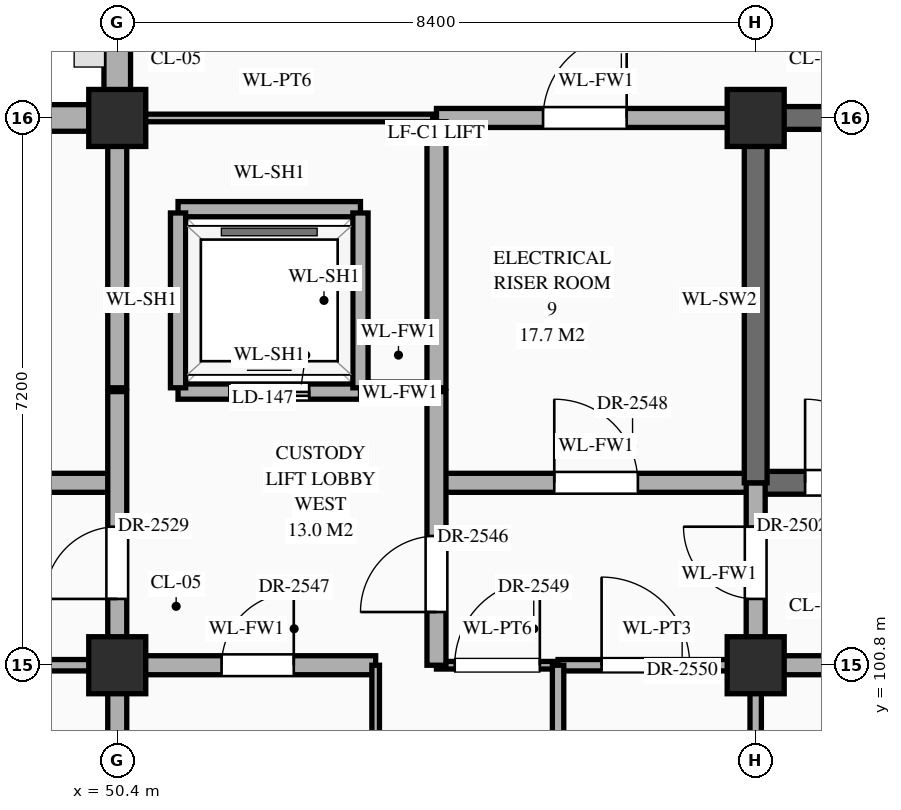
"""IFC4 building model, lengths in metres.
Left out: names, types, materials, properties, quantities, classifications, styles, units other than length and angle.
Written with IfcOpenShell. Run it as: python <this file> out.ifc"""

import sys

from ifc_helpers import new_model, si_unit, direction, frame, frame_2d, origin, origin_2d, place, context, subcontext, project, spatial, rectangle, extrude, element, fill, save


model = new_model("IFC4")
c1 = context("Model", 3, precision=1e-05, world=origin(), true_north=direction((0.0, 1.0)))
c2 = subcontext(c1, "Body", "Model", "MODEL_VIEW")
j1 = project(units=[si_unit("LENGTHUNIT", "METRE"), si_unit("PLANEANGLEUNIT", "RADIAN")], contexts=[c1])
p1 = place(None, origin())
s1 = spatial("IfcSite", under=j1, at=p1, CompositionType="ELEMENT")
p2 = place(p1, origin())
s2 = spatial("IfcBuilding", under=s1, at=p2, CompositionType="ELEMENT")
p3 = place(p2, frame((0.0, 0.0, 35.1)))
s3 = spatial("IfcBuildingStorey", under=s2, at=p3, CompositionType="ELEMENT", Elevation=35.1)
for number, where, z_axis, x_axis in (
    (1, (50.4, 100.8, 0.0), (0.0, 0.0, 1.0), (1.0, 0.0, 0.0)),
    (2, (50.4, 108.0, 0.0), (0.0, 0.0, 1.0), (1.0, 0.0, 0.0)),
    (3, (58.8, 100.8, 0.0), (0.0, 0.0, 1.0), (1.0, 0.0, 0.0)),
    (4, (58.8, 108.0, 0.0), (0.0, 0.0, 1.0), (1.0, 0.0, 0.0)),
):
    element("IfcColumn", number, at=place(p3, frame(where, z_axis=z_axis, x_axis=x_axis)), inside=s3, PredefinedType="COLUMN", context=c2, shape_type="SweptSolid", body=[
        extrude(rectangle(XDim=0.75, YDim=0.75, at=origin_2d()), origin(), (0.0, 0.0, 1.0), 4.2),
    ])
p4 = place(p3, frame((42.37, 108.0, 0.0), z_axis=(0.0, 0.0, 1.0), x_axis=(1.0, 0.0, 0.0)))
e5 = element("IfcWall", 5, at=p4, inside=s3, PredefinedType="STANDARD", context=c2, shape_type="SweptSolid", body=[
    extrude(rectangle(XDim=7.66, YDim=0.35, at=frame_2d((3.83, 0.0))), origin(), (0.0, 0.0, 1.0), 3.3),
])
p5 = place(p3, frame((50.4, 108.37, 0.0), z_axis=(0.0, 0.0, 1.0), x_axis=(0.0, 1.0, 0.0)))
e6 = element("IfcWall", 6, at=p5, inside=s3, PredefinedType="STANDARD", context=c2, shape_type="SweptSolid", body=[
    extrude(rectangle(XDim=6.46, YDim=0.35, at=frame_2d((3.23, 0.0))), origin(), (0.0, 0.0, 1.0), 3.3),
])
p6 = place(p5, frame((4.08, 0.0, 0.85)))
e7 = element("IfcOpeningElement", 7, at=p6, cuts=e6, PredefinedType="OPENING", context=c2, shape_type="SweptSolid", body=[
    extrude(rectangle(XDim=0.9, YDim=2.12, at=frame_2d((0.45, 1.06))), frame((0.0, 0.187, 0.0), z_axis=(0.0, -1.0, 0.0), x_axis=(1.0, 0.0, 0.0)), (0.0, 0.0, 1.0), 0.374),
])
p7 = place(p3, frame((46.2, 100.8, 0.0), z_axis=(0.0, 0.0, 1.0), x_axis=(1.0, 0.0, 0.0)))
e8 = element("IfcWall", 8, at=p7, inside=s3, PredefinedType="STANDARD", context=c2, shape_type="SweptSolid", body=[
    extrude(rectangle(XDim=4.2, YDim=0.15, at=frame_2d((2.1, 0.0))), origin(), (0.0, 0.0, 1.0), 3.1),
])
p8 = place(p7, frame((1.433, 0.0, 0.0)))
e9 = element("IfcOpeningElement", 9, at=p8, cuts=e8, PredefinedType="OPENING", context=c2, shape_type="SweptSolid", body=[
    extrude(rectangle(XDim=1.04, YDim=2.2, at=frame_2d((0.52, 1.1))), frame((0.0, 0.087, 0.0), z_axis=(0.0, -1.0, 0.0), x_axis=(1.0, 0.0, 0.0)), (0.0, 0.0, 1.0), 0.174),
])
p9 = place(p3, frame((50.4, 100.8, 0.0), z_axis=(0.0, 0.0, 1.0), x_axis=(1.0, 0.0, 0.0)))
e10 = element("IfcWall", 10, at=p9, inside=s3, PredefinedType="STANDARD", context=c2, shape_type="SweptSolid", body=[
    extrude(rectangle(XDim=3.4, YDim=0.25, at=frame_2d((1.7, 0.0))), origin(), (0.0, 0.0, 1.0), 3.1),
])
p10 = place(p9, frame((1.373, 0.0, 0.0)))
e11 = element("IfcOpeningElement", 11, at=p10, cuts=e10, PredefinedType="OPENING", context=c2, shape_type="SweptSolid", body=[
    extrude(rectangle(XDim=0.95, YDim=2.15, at=frame_2d((0.475, 1.075))), frame((0.0, 0.137, 0.0), z_axis=(0.0, -1.0, 0.0), x_axis=(1.0, 0.0, 0.0)), (0.0, 0.0, 1.0), 0.274),
])
p11 = place(p3, frame((54.6, 100.8, 0.0), z_axis=(0.0, 0.0, 1.0), x_axis=(1.0, 0.0, 0.0)))
e12 = element("IfcWall", 12, at=p11, inside=s3, PredefinedType="STANDARD", context=c2, shape_type="SweptSolid", body=[
    extrude(rectangle(XDim=1.6, YDim=0.1, at=frame_2d((0.8, 0.0))), origin(), (0.0, 0.0, 1.0), 3.1),
])
p12 = place(p11, frame((0.24, 0.0, 0.0)))
e13 = element("IfcOpeningElement", 13, at=p12, cuts=e12, PredefinedType="OPENING", context=c2, shape_type="SweptSolid", body=[
    extrude(rectangle(XDim=1.12, YDim=2.25, at=frame_2d((0.56, 1.125))), frame((0.0, 0.062, 0.0), z_axis=(0.0, -1.0, 0.0), x_axis=(1.0, 0.0, 0.0)), (0.0, 0.0, 1.0), 0.124),
])
p13 = place(p3, frame((56.2, 100.8, 0.0), z_axis=(0.0, 0.0, 1.0), x_axis=(1.0, 0.0, 0.0)))
e14 = element("IfcWall", 14, at=p13, inside=s3, PredefinedType="STANDARD", context=c2, shape_type="SweptSolid", body=[
    extrude(rectangle(XDim=2.6, YDim=0.15, at=frame_2d((1.3, 0.0))), origin(), (0.0, 0.0, 1.0), 3.1),
])
p14 = place(p13, frame((0.573, 0.0, 0.0)))
e15 = element("IfcOpeningElement", 15, at=p14, cuts=e14, PredefinedType="OPENING", context=c2, shape_type="SweptSolid", body=[
    extrude(rectangle(XDim=1.16, YDim=2.3, at=frame_2d((0.58, 1.15))), frame((0.0, 0.087, 0.0), z_axis=(0.0, -1.0, 0.0), x_axis=(1.0, 0.0, 0.0)), (0.0, 0.0, 1.0), 0.174),
])
p15 = place(p3, frame((58.8, 100.8, 0.0), z_axis=(0.0, 0.0, 1.0), x_axis=(1.0, 0.0, 0.0)))
e16 = element("IfcWall", 16, at=p15, inside=s3, PredefinedType="STANDARD", context=c2, shape_type="SweptSolid", body=[
    extrude(rectangle(XDim=12.6, YDim=0.25, at=frame_2d((6.3, 0.0))), origin(), (0.0, 0.0, 1.0), 3.1),
])
p16 = place(p15, frame((3.65, 0.0, 0.0)))
e17 = element("IfcOpeningElement", 17, at=p16, cuts=e16, PredefinedType="OPENING", context=c2, shape_type="SweptSolid", body=[
    extrude(rectangle(XDim=1.1, YDim=2.2, at=frame_2d((0.55, 1.1))), frame((0.0, 0.137, 0.0), z_axis=(0.0, -1.0, 0.0), x_axis=(1.0, 0.0, 0.0)), (0.0, 0.0, 1.0), 0.274),
])
p17 = place(p3, frame((46.2, 103.2, 0.0), z_axis=(0.0, 0.0, 1.0), x_axis=(1.0, 0.0, 0.0)))
e18 = element("IfcWall", 18, at=p17, inside=s3, PredefinedType="STANDARD", context=c2, shape_type="SweptSolid", body=[
    extrude(rectangle(XDim=4.2, YDim=0.25, at=frame_2d((2.1, 0.0))), origin(), (0.0, 0.0, 1.0), 3.95),
])
p18 = place(p17, frame((1.6, 0.0, 0.0)))
e19 = element("IfcOpeningElement", 19, at=p18, cuts=e18, PredefinedType="OPENING", context=c2, shape_type="SweptSolid", body=[
    extrude(rectangle(XDim=1.0, YDim=2.2, at=frame_2d((0.5, 1.1))), frame((0.0, 0.137, 0.0), z_axis=(0.0, -1.0, 0.0), x_axis=(1.0, 0.0, 0.0)), (0.0, 0.0, 1.0), 0.274),
])
p19 = place(p3, frame((54.6, 103.2, 0.0), z_axis=(0.0, 0.0, 1.0), x_axis=(1.0, 0.0, 0.0)))
e20 = element("IfcWall", 20, at=p19, inside=s3, PredefinedType="STANDARD", context=c2, shape_type="SweptSolid", body=[
    extrude(rectangle(XDim=4.2, YDim=0.25, at=frame_2d((2.1, 0.0))), origin(), (0.0, 0.0, 1.0), 3.95),
])
p20 = place(p19, frame((1.55, 0.0, 0.0)))
e21 = element("IfcOpeningElement", 21, at=p20, cuts=e20, PredefinedType="OPENING", context=c2, shape_type="SweptSolid", body=[
    extrude(rectangle(XDim=1.1, YDim=2.2, at=frame_2d((0.55, 1.1))), frame((0.0, 0.137, 0.0), z_axis=(0.0, -1.0, 0.0), x_axis=(1.0, 0.0, 0.0)), (0.0, 0.0, 1.0), 0.274),
])
p21 = place(p3, frame((58.8, 103.2, 0.0), z_axis=(0.0, 0.0, 1.0), x_axis=(1.0, 0.0, 0.0)))
e22 = element("IfcWall", 22, at=p21, inside=s3, PredefinedType="SHEAR", context=c2, shape_type="SweptSolid", body=[
    extrude(rectangle(XDim=8.4, YDim=0.3, at=frame_2d((4.2, 0.0))), origin(), (0.0, 0.0, 1.0), 3.95),
])
p22 = place(p21, frame((0.65, 0.0, 0.0)))
e23 = element("IfcOpeningElement", 23, at=p22, cuts=e22, PredefinedType="OPENING", context=c2, shape_type="SweptSolid", body=[
    extrude(rectangle(XDim=1.1, YDim=2.2, at=frame_2d((0.55, 1.1))), frame((0.0, 0.162, 0.0), z_axis=(0.0, -1.0, 0.0), x_axis=(1.0, 0.0, 0.0)), (0.0, 0.0, 1.0), 0.324),
])
p23 = place(p3, frame((51.2, 104.4, 0.0), z_axis=(0.0, 0.0, 1.0), x_axis=(1.0, 0.0, 0.0)))
e24 = element("IfcWall", 24, at=p23, inside=s3, PredefinedType="STANDARD", context=c2, shape_type="SweptSolid", body=[
    extrude(rectangle(XDim=2.4, YDim=0.2, at=frame_2d((1.2, 0.0))), origin(), (0.0, 0.0, 1.0), 3.95),
])
p24 = place(p23, frame((0.675, 0.0, 0.0)))
e25 = element("IfcOpeningElement", 25, at=p24, cuts=e24, PredefinedType="OPENING", context=c2, shape_type="SweptSolid", body=[
    extrude(rectangle(XDim=1.05, YDim=2.15, at=frame_2d((0.525, 1.075))), frame((0.0, 0.112, 0.0), z_axis=(0.0, -1.0, 0.0), x_axis=(1.0, 0.0, 0.0)), (0.0, 0.0, 1.0), 0.224),
])
p25 = place(p3, frame((53.65, 104.4, 0.0), z_axis=(0.0, 0.0, 1.0), x_axis=(1.0, 0.0, 0.0)))
e26 = element("IfcWall", 26, at=p25, inside=s3, PredefinedType="STANDARD", context=c2, shape_type="SweptSolid", body=[
    extrude(rectangle(XDim=0.9, YDim=0.25, at=frame_2d((0.45, 0.0))), origin(), (0.0, 0.0, 1.0), 3.95),
])
p26 = place(p3, frame((51.2, 106.8, 0.0), z_axis=(0.0, 0.0, 1.0), x_axis=(1.0, 0.0, 0.0)))
e27 = element("IfcWall", 27, at=p26, inside=s3, PredefinedType="STANDARD", context=c2, shape_type="SweptSolid", body=[
    extrude(rectangle(XDim=2.4, YDim=0.2, at=frame_2d((1.2, 0.0))), origin(), (0.0, 0.0, 1.0), 3.95),
])
p27 = place(p3, frame((50.45, 108.0, 0.0), z_axis=(0.0, 0.0, 1.0), x_axis=(1.0, 0.0, 0.0)))
e28 = element("IfcWall", 28, at=p27, inside=s3, PredefinedType="STANDARD", context=c2, shape_type="SweptSolid", body=[
    extrude(rectangle(XDim=4.1, YDim=0.1, at=frame_2d((2.05, 0.0))), origin(), (0.0, 0.0, 1.0), 3.1),
])
p28 = place(p3, frame((54.6, 108.0, 0.0), z_axis=(0.0, 0.0, 1.0), x_axis=(1.0, 0.0, 0.0)))
e29 = element("IfcWall", 29, at=p28, inside=s3, PredefinedType="STANDARD", context=c2, shape_type="SweptSolid", body=[
    extrude(rectangle(XDim=4.2, YDim=0.25, at=frame_2d((2.1, 0.0))), origin(), (0.0, 0.0, 1.0), 3.1),
])
p29 = place(p28, frame((1.403, 0.0, 0.0)))
e30 = element("IfcOpeningElement", 30, at=p29, cuts=e29, PredefinedType="OPENING", context=c2, shape_type="SweptSolid", body=[
    extrude(rectangle(XDim=1.1, YDim=2.2, at=frame_2d((0.55, 1.1))), frame((0.0, 0.137, 0.0), z_axis=(0.0, -1.0, 0.0), x_axis=(1.0, 0.0, 0.0)), (0.0, 0.0, 1.0), 0.274),
])
p30 = place(p3, frame((58.8, 108.0, 0.0), z_axis=(0.0, 0.0, 1.0), x_axis=(1.0, 0.0, 0.0)))
e31 = element("IfcWall", 31, at=p30, inside=s3, PredefinedType="SHEAR", context=c2, shape_type="SweptSolid", body=[
    extrude(rectangle(XDim=8.4, YDim=0.3, at=frame_2d((4.2, 0.0))), origin(), (0.0, 0.0, 1.0), 3.95),
])
p31 = place(p3, frame((50.4, 91.2, 0.0), z_axis=(0.0, 0.0, 1.0), x_axis=(0.0, 1.0, 0.0)))
e32 = element("IfcWall", 32, at=p31, inside=s3, PredefinedType="STANDARD", context=c2, shape_type="SweptSolid", body=[
    extrude(rectangle(XDim=13.2, YDim=0.25, at=frame_2d((6.6, 0.0))), origin(), (0.0, 0.0, 1.0), 3.2),
])
p32 = place(p31, frame((0.577, 0.0, 0.0)))
e33 = element("IfcOpeningElement", 33, at=p32, cuts=e32, PredefinedType="OPENING", context=c2, shape_type="SweptSolid", body=[
    extrude(rectangle(XDim=0.95, YDim=2.15, at=frame_2d((0.475, 1.075))), frame((0.0, 0.137, 0.0), z_axis=(0.0, -1.0, 0.0), x_axis=(1.0, 0.0, 0.0)), (0.0, 0.0, 1.0), 0.274),
])
p33 = place(p31, frame((10.472, 0.0, 0.0)))
e34 = element("IfcOpeningElement", 34, at=p33, cuts=e32, PredefinedType="OPENING", context=c2, shape_type="SweptSolid", body=[
    extrude(rectangle(XDim=0.95, YDim=2.15, at=frame_2d((0.475, 1.075))), frame((0.0, 0.137, 0.0), z_axis=(0.0, -1.0, 0.0), x_axis=(1.0, 0.0, 0.0)), (0.0, 0.0, 1.0), 0.274),
])
p34 = place(p31, frame((3.198, 0.0, 0.0)))
e35 = element("IfcOpeningElement", 35, at=p34, cuts=e32, PredefinedType="OPENING", context=c2, shape_type="SweptSolid", body=[
    extrude(rectangle(XDim=1.1, YDim=2.2, at=frame_2d((0.55, 1.1))), frame((0.0, 0.137, 0.0), z_axis=(0.0, -1.0, 0.0), x_axis=(1.0, 0.0, 0.0)), (0.0, 0.0, 1.0), 0.274),
])
p35 = place(p3, frame((50.4, 104.45, 0.0), z_axis=(0.0, 0.0, 1.0), x_axis=(0.0, 1.0, 0.0)))
e36 = element("IfcWall", 36, at=p35, inside=s3, PredefinedType="STANDARD", context=c2, shape_type="SweptSolid", body=[
    extrude(rectangle(XDim=3.46, YDim=0.25, at=frame_2d((1.73, 0.0))), origin(), (0.0, 0.0, 1.0), 3.2),
])
for number, where, z_axis, x_axis in (
    (37, (51.2, 104.45, 0.0), (0.0, 0.0, 1.0), (0.0, 1.0, 0.0)),
    (38, (53.6, 104.45, 0.0), (0.0, 0.0, 1.0), (0.0, 1.0, 0.0)),
):
    element("IfcWall", number, at=place(p3, frame(where, z_axis=z_axis, x_axis=x_axis)), inside=s3, PredefinedType="STANDARD", context=c2, shape_type="SweptSolid", body=[
        extrude(rectangle(XDim=2.3, YDim=0.2, at=frame_2d((1.15, 0.0))), origin(), (0.0, 0.0, 1.0), 3.95),
    ])
p36 = place(p3, frame((53.8, 96.0, 0.0), z_axis=(0.0, 0.0, 1.0), x_axis=(0.0, 1.0, 0.0)))
e39 = element("IfcWall", 39, at=p36, inside=s3, PredefinedType="STANDARD", context=c2, shape_type="SweptSolid", body=[
    extrude(rectangle(XDim=4.8, YDim=0.1, at=frame_2d((2.4, 0.0))), origin(), (0.0, 0.0, 1.0), 3.95),
])
p37 = place(p36, frame((1.87, 0.0, 0.0)))
e40 = element("IfcOpeningElement", 40, at=p37, cuts=e39, PredefinedType="OPENING", context=c2, shape_type="SweptSolid", body=[
    extrude(rectangle(XDim=1.06, YDim=2.4, at=frame_2d((0.53, 1.2))), frame((0.0, 0.062, 0.0), z_axis=(0.0, -1.0, 0.0), x_axis=(1.0, 0.0, 0.0)), (0.0, 0.0, 1.0), 0.124),
])
p38 = place(p3, frame((54.6, 100.8, 0.0), z_axis=(0.0, 0.0, 1.0), x_axis=(0.0, 1.0, 0.0)))
e41 = element("IfcWall", 41, at=p38, inside=s3, PredefinedType="STANDARD", context=c2, shape_type="SweptSolid", body=[
    extrude(rectangle(XDim=3.6, YDim=0.25, at=frame_2d((1.8, 0.0))), origin(), (0.0, 0.0, 1.0), 3.65),
])
p39 = place(p38, frame((0.7, 0.0, 0.0)))
e42 = element("IfcOpeningElement", 42, at=p39, cuts=e41, PredefinedType="OPENING", context=c2, shape_type="SweptSolid", body=[
    extrude(rectangle(XDim=1.0, YDim=2.2, at=frame_2d((0.5, 1.1))), frame((0.0, 0.137, 0.0), z_axis=(0.0, -1.0, 0.0), x_axis=(1.0, 0.0, 0.0)), (0.0, 0.0, 1.0), 0.274),
])
p40 = place(p3, frame((54.6, 104.45, 0.0), z_axis=(0.0, 0.0, 1.0), x_axis=(0.0, 1.0, 0.0)))
e43 = element("IfcWall", 43, at=p40, inside=s3, PredefinedType="STANDARD", context=c2, shape_type="SweptSolid", body=[
    extrude(rectangle(XDim=3.5, YDim=0.25, at=frame_2d((1.75, 0.0))), origin(), (0.0, 0.0, 1.0), 3.65),
])
p41 = place(p3, frame((56.2, 96.0, 0.0), z_axis=(0.0, 0.0, 1.0), x_axis=(0.0, 1.0, 0.0)))
e44 = element("IfcWall", 44, at=p41, inside=s3, PredefinedType="STANDARD", context=c2, shape_type="SweptSolid", body=[
    extrude(rectangle(XDim=4.8, YDim=0.15, at=frame_2d((2.4, 0.0))), origin(), (0.0, 0.0, 1.0), 3.95),
])
p42 = place(p41, frame((1.83, 0.0, 0.0)))
e45 = element("IfcOpeningElement", 45, at=p42, cuts=e44, PredefinedType="OPENING", context=c2, shape_type="SweptSolid", body=[
    extrude(rectangle(XDim=1.14, YDim=2.4, at=frame_2d((0.57, 1.2))), frame((0.0, 0.087, 0.0), z_axis=(0.0, -1.0, 0.0), x_axis=(1.0, 0.0, 0.0)), (0.0, 0.0, 1.0), 0.174),
])
p43 = place(p3, frame((58.8, 96.0, 0.0), z_axis=(0.0, 0.0, 1.0), x_axis=(0.0, 1.0, 0.0)))
e46 = element("IfcWall", 46, at=p43, inside=s3, PredefinedType="STANDARD", context=c2, shape_type="SweptSolid", body=[
    extrude(rectangle(XDim=4.8, YDim=0.15, at=frame_2d((2.4, 0.0))), origin(), (0.0, 0.0, 1.0), 3.2),
])
p44 = place(p3, frame((58.8, 100.8, 0.0), z_axis=(0.0, 0.0, 1.0), x_axis=(0.0, 1.0, 0.0)))
e47 = element("IfcWall", 47, at=p44, inside=s3, PredefinedType="STANDARD", context=c2, shape_type="SweptSolid", body=[
    extrude(rectangle(XDim=2.4, YDim=0.25, at=frame_2d((1.2, 0.0))), origin(), (0.0, 0.0, 1.0), 3.2),
])
p45 = place(p44, frame((0.873, 0.0, 0.0)))
e48 = element("IfcOpeningElement", 48, at=p45, cuts=e47, PredefinedType="OPENING", context=c2, shape_type="SweptSolid", body=[
    extrude(rectangle(XDim=0.95, YDim=2.15, at=frame_2d((0.475, 1.075))), frame((0.0, 0.137, 0.0), z_axis=(0.0, -1.0, 0.0), x_axis=(1.0, 0.0, 0.0)), (0.0, 0.0, 1.0), 0.274),
])
p46 = place(p3, frame((58.8, 103.2, 0.0), z_axis=(0.0, 0.0, 1.0), x_axis=(0.0, 1.0, 0.0)))
e49 = element("IfcWall", 49, at=p46, inside=s3, PredefinedType="SHEAR", context=c2, shape_type="SweptSolid", body=[
    extrude(rectangle(XDim=4.8, YDim=0.3, at=frame_2d((2.4, 0.0))), origin(), (0.0, 0.0, 1.0), 3.95),
])
p47 = place(p24, origin())
e50 = element("IfcDoor", 50, at=p47, inside=s3, OperationType="DOUBLE_DOOR_SLIDING", PredefinedType="DOOR", context=c2, shape_type="SweptSolid", body=[
    extrude(rectangle(XDim=1.05, YDim=2.15, at=frame_2d((0.525, 1.075))), frame((0.0, 0.025, 0.0), z_axis=(0.0, -1.0, 0.0), x_axis=(1.0, 0.0, 0.0)), (0.0, 0.0, 1.0), 0.05),
])
fill(e25, e50)
p48 = place(p22, origin())
e51 = element("IfcDoor", 51, at=p48, inside=s3, OperationType="SINGLE_SWING_LEFT", PredefinedType="DOOR", context=c2, shape_type="SweptSolid", body=[
    extrude(rectangle(XDim=1.1, YDim=2.2, at=frame_2d((0.55, 1.1))), frame((0.0, 0.025, 0.0), z_axis=(0.0, -1.0, 0.0), x_axis=(1.0, 0.0, 0.0)), (0.0, 0.0, 1.0), 0.05),
])
fill(e23, e51)
p49 = place(p45, origin())
e52 = element("IfcDoor", 52, at=p49, inside=s3, OperationType="SINGLE_SWING_RIGHT", PredefinedType="DOOR", context=c2, shape_type="SweptSolid", body=[
    extrude(rectangle(XDim=0.95, YDim=2.15, at=frame_2d((0.475, 1.075))), frame((0.0, 0.025, 0.0), z_axis=(0.0, -1.0, 0.0), x_axis=(1.0, 0.0, 0.0)), (0.0, 0.0, 1.0), 0.05),
])
fill(e48, e52)
p50 = place(p33, origin())
e53 = element("IfcDoor", 53, at=p50, inside=s3, OperationType="SINGLE_SWING_LEFT", PredefinedType="DOOR", context=c2, shape_type="SweptSolid", body=[
    extrude(rectangle(XDim=0.95, YDim=2.15, at=frame_2d((0.475, 1.075))), frame((0.0, 0.025, 0.0), z_axis=(0.0, -1.0, 0.0), x_axis=(1.0, 0.0, 0.0)), (0.0, 0.0, 1.0), 0.05),
])
fill(e34, e53)
p51 = place(p39, origin())
e54 = element("IfcDoor", 54, at=p51, inside=s3, OperationType="SINGLE_SWING_LEFT", PredefinedType="DOOR", context=c2, shape_type="SweptSolid", body=[
    extrude(rectangle(XDim=1.0, YDim=2.2, at=frame_2d((0.5, 1.1))), frame((0.0, 0.025, 0.0), z_axis=(0.0, -1.0, 0.0), x_axis=(1.0, 0.0, 0.0)), (0.0, 0.0, 1.0), 0.05),
])
fill(e42, e54)
p52 = place(p10, origin())
e55 = element("IfcDoor", 55, at=p52, inside=s3, OperationType="SINGLE_SWING_RIGHT", PredefinedType="DOOR", context=c2, shape_type="SweptSolid", body=[
    extrude(rectangle(XDim=0.95, YDim=2.15, at=frame_2d((0.475, 1.075))), frame((0.0, 0.025, 0.0), z_axis=(0.0, -1.0, 0.0), x_axis=(1.0, 0.0, 0.0)), (0.0, 0.0, 1.0), 0.05),
])
fill(e11, e55)
p53 = place(p20, origin())
e56 = element("IfcDoor", 56, at=p53, inside=s3, OperationType="SINGLE_SWING_LEFT", PredefinedType="DOOR", context=c2, shape_type="SweptSolid", body=[
    extrude(rectangle(XDim=1.1, YDim=2.2, at=frame_2d((0.55, 1.1))), frame((0.0, 0.025, 0.0), z_axis=(0.0, -1.0, 0.0), x_axis=(1.0, 0.0, 0.0)), (0.0, 0.0, 1.0), 0.05),
])
fill(e21, e56)
p54 = place(p12, origin())
e57 = element("IfcDoor", 57, at=p54, inside=s3, OperationType="SINGLE_SWING_RIGHT", PredefinedType="DOOR", context=c2, shape_type="SweptSolid", body=[
    extrude(rectangle(XDim=1.12, YDim=2.25, at=frame_2d((0.56, 1.125))), frame((0.0, 0.025, 0.0), z_axis=(0.0, -1.0, 0.0), x_axis=(1.0, 0.0, 0.0)), (0.0, 0.0, 1.0), 0.05),
])
fill(e13, e57)
p55 = place(p14, origin())
e58 = element("IfcDoor", 58, at=p55, inside=s3, OperationType="SINGLE_SWING_LEFT", PredefinedType="DOOR", context=c2, shape_type="SweptSolid", body=[
    extrude(rectangle(XDim=1.16, YDim=2.3, at=frame_2d((0.58, 1.15))), frame((0.0, 0.025, 0.0), z_axis=(0.0, -1.0, 0.0), x_axis=(1.0, 0.0, 0.0)), (0.0, 0.0, 1.0), 0.05),
])
fill(e15, e58)
p56 = place(p29, origin())
e59 = element("IfcDoor", 59, at=p56, inside=s3, OperationType="SINGLE_SWING_RIGHT", PredefinedType="DOOR", context=c2, shape_type="SweptSolid", body=[
    extrude(rectangle(XDim=1.1, YDim=2.2, at=frame_2d((0.55, 1.1))), frame((0.0, 0.025, 0.0), z_axis=(0.0, -1.0, 0.0), x_axis=(1.0, 0.0, 0.0)), (0.0, 0.0, 1.0), 0.05),
])
fill(e30, e59)
save(model, sys.argv[1])
